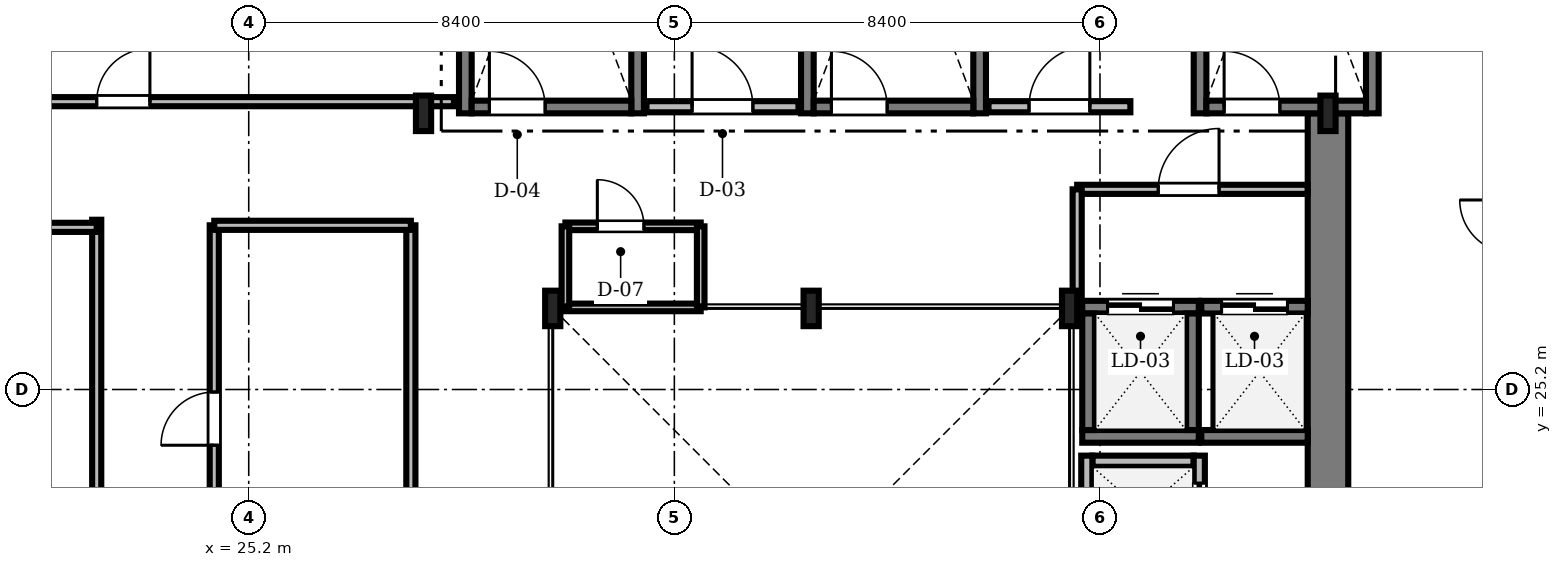
"""IFC4 building model, lengths in metres.
Left out: names, types, materials, properties, quantities, classifications, styles, units other than length and angle.
Written with IfcOpenShell. Run it as: python <this file> out.ifc"""

import sys

from ifc_helpers import new_model, si_unit, direction, frame, frame_2d, origin, origin_2d, place, context, subcontext, project, spatial, rectangle, i_section, extrude, source, transform, mapped, element, fill, save


model = new_model("IFC4")
c1 = context("Model", 3, precision=1e-05, world=origin(), true_north=direction((0.0, 1.0)))
c2 = subcontext(c1, "Body", "Model", "MODEL_VIEW")
j1 = project(units=[si_unit("LENGTHUNIT", "METRE"), si_unit("PLANEANGLEUNIT", "RADIAN")], contexts=[c1])
p1 = place(None, origin())
s1 = spatial("IfcSite", under=j1, at=p1, CompositionType="ELEMENT")
p2 = place(p1, origin())
s2 = spatial("IfcBuilding", under=s1, at=p2, CompositionType="ELEMENT")
p3 = place(p2, frame((0.0, 0.0, 192.3)))
s3 = spatial("IfcBuildingStorey", under=s2, at=p3, CompositionType="ELEMENT", Elevation=192.3)
m1 = source(origin(), c2, "Body", "SweptSolid", [
    extrude(rectangle(XDim=13.15, YDim=0.8, at=frame_2d((6.575, 0.0))), origin(), (0.0, 0.0, 1.0), 3.53),
])
p4 = place(p3, frame((46.5, 17.5, 0.0), z_axis=(0.0, 0.0, 1.0), x_axis=(0.0, 1.0, 0.0)))
e1 = element("IfcWall", 1, at=p4, inside=s3, PredefinedType="SHEAR", context=c2, shape_type="MappedRepresentation", body=[
    mapped(m1, transform((0.0, 0.0, 0.0), scale=1.0)),
])
m2 = source(origin(), c2, "Body", "SweptSolid", [
    extrude(i_section(OverallWidth=0.3, OverallDepth=0.7, WebThickness=0.017, FlangeThickness=0.032, FilletRadius=0.027, at=origin_2d()), origin(), (0.0, 0.0, 1.0), 3.53),
])
for number, where, z_axis, x_axis in (
    (2, (41.4, 26.8, 0.0), (0.0, 0.0, 1.0), (1.0, 0.0, 0.0)),
    (3, (36.3, 26.8, 0.0), (0.0, 0.0, 1.0), (1.0, 0.0, 0.0)),
    (4, (31.2, 26.8, 0.0), (0.0, 0.0, 1.0), (1.0, 0.0, 0.0)),
    (5, (28.65, 30.65, 0.0), (0.0, 0.0, 1.0), (1.0, 0.0, 0.0)),
    (6, (46.5, 30.65, 0.0), (0.0, 0.0, 1.0), (1.0, 0.0, 0.0)),
):
    element("IfcColumn", number, at=place(p3, frame(where, z_axis=z_axis, x_axis=x_axis)), inside=s3, PredefinedType="COLUMN", context=c2, shape_type="MappedRepresentation", body=[
        mapped(m2, transform((0.0, 0.0, 0.0), scale=1.0)),
    ])
m3 = source(origin(), c2, "Body", "SweptSolid", [
    extrude(rectangle(XDim=9.25, YDim=0.25, at=frame_2d((4.625, 0.0))), origin(), (0.0, 0.0, 1.0), 3.55),
])
for number, where, z_axis, x_axis in (
    (7, (29.475, 30.65, 0.0), (0.0, 0.0, 1.0), (0.0, 1.0, 0.0)),
    (8, (32.875, 30.65, 0.0), (0.0, 0.0, 1.0), (0.0, 1.0, 0.0)),
):
    element("IfcWall", number, at=place(p3, frame(where, z_axis=z_axis, x_axis=x_axis)), inside=s3, PredefinedType="SOLIDWALL", context=c2, shape_type="MappedRepresentation", body=[
        mapped(m3, transform((0.0, 0.0, 0.0), scale=1.0)),
    ])
m4 = source(origin(), c2, "Body", "SweptSolid", [
    extrude(rectangle(XDim=3.15, YDim=0.25, at=frame_2d((1.575, 0.0))), origin(), (0.0, 0.0, 1.0), 3.55),
])
p5 = place(p3, frame((29.6, 30.775, 0.0), z_axis=(0.0, 0.0, 1.0), x_axis=(1.0, 0.0, 0.0)))
e9 = element("IfcWall", 9, at=p5, inside=s3, PredefinedType="SOLIDWALL", context=c2, shape_type="MappedRepresentation", body=[
    mapped(m4, transform((0.0, 0.0, 0.0), scale=1.0)),
])
m5 = source(origin(), c2, "Body", "SweptSolid", [
    extrude(rectangle(XDim=1.1, YDim=2.2, at=frame_2d((0.55, 1.1))), frame((0.0, 0.135, 0.0), z_axis=(0.0, -1.0, 0.0), x_axis=(1.0, 0.0, 0.0)), (0.0, 0.0, 1.0), 0.27),
])
p6 = place(p5, frame((0.35, 0.0, 0.0)))
e10 = element("IfcOpeningElement", 10, at=p6, cuts=e9, PredefinedType="OPENING", context=c2, shape_type="MappedRepresentation", body=[
    mapped(m5, transform((0.0, 0.0, 0.0), scale=1.0)),
])
for number, where, z_axis, x_axis in (
    (11, (36.225, 30.65, 0.0), (0.0, 0.0, 1.0), (0.0, 1.0, 0.0)),
    (12, (39.625, 30.65, 0.0), (0.0, 0.0, 1.0), (0.0, 1.0, 0.0)),
):
    element("IfcWall", number, at=place(p3, frame(where, z_axis=z_axis, x_axis=x_axis)), inside=s3, PredefinedType="SOLIDWALL", context=c2, shape_type="MappedRepresentation", body=[
        mapped(m3, transform((0.0, 0.0, 0.0), scale=1.0)),
    ])
p7 = place(p3, frame((36.35, 30.775, 0.0), z_axis=(0.0, 0.0, 1.0), x_axis=(1.0, 0.0, 0.0)))
e13 = element("IfcWall", 13, at=p7, inside=s3, PredefinedType="SOLIDWALL", context=c2, shape_type="MappedRepresentation", body=[
    mapped(m4, transform((0.0, 0.0, 0.0), scale=1.0)),
])
p8 = place(p7, frame((0.35, 0.0, 0.0)))
e14 = element("IfcOpeningElement", 14, at=p8, cuts=e13, PredefinedType="OPENING", context=c2, shape_type="MappedRepresentation", body=[
    mapped(m5, transform((0.0, 0.0, 0.0), scale=1.0)),
])
for number, where, z_axis, x_axis in (
    (15, (43.975, 30.65, 0.0), (0.0, 0.0, 1.0), (0.0, 1.0, 0.0)),
    (16, (47.375, 30.65, 0.0), (0.0, 0.0, 1.0), (0.0, 1.0, 0.0)),
):
    element("IfcWall", number, at=place(p3, frame(where, z_axis=z_axis, x_axis=x_axis)), inside=s3, PredefinedType="SOLIDWALL", context=c2, shape_type="MappedRepresentation", body=[
        mapped(m3, transform((0.0, 0.0, 0.0), scale=1.0)),
    ])
p9 = place(p3, frame((44.1, 30.775, 0.0), z_axis=(0.0, 0.0, 1.0), x_axis=(1.0, 0.0, 0.0)))
e17 = element("IfcWall", 17, at=p9, inside=s3, PredefinedType="SOLIDWALL", context=c2, shape_type="MappedRepresentation", body=[
    mapped(m4, transform((0.0, 0.0, 0.0), scale=1.0)),
])
p10 = place(p9, frame((0.35, 0.0, 0.0)))
e18 = element("IfcOpeningElement", 18, at=p10, cuts=e17, PredefinedType="OPENING", context=c2, shape_type="MappedRepresentation", body=[
    mapped(m5, transform((0.0, 0.0, 0.0), scale=1.0)),
])
m6 = source(origin(), c2, "Body", "SweptSolid", [
    extrude(rectangle(XDim=3.0, YDim=0.22, at=frame_2d((1.5, 0.0))), origin(), (0.0, 0.0, 1.0), 3.53),
])
p11 = place(p3, frame((33.05, 30.78, 0.0), z_axis=(0.0, 0.0, 1.0), x_axis=(1.0, 0.0, 0.0)))
e19 = element("IfcWall", 19, at=p11, inside=s3, PredefinedType="SOLIDWALL", context=c2, shape_type="MappedRepresentation", body=[
    mapped(m6, transform((0.0, 0.0, 0.0), scale=1.0)),
])
m7 = source(origin(), c2, "Body", "SweptSolid", [
    extrude(rectangle(XDim=1.2, YDim=2.2, at=frame_2d((0.6, 1.1))), frame((0.0, 0.12, 0.0), z_axis=(0.0, -1.0, 0.0), x_axis=(1.0, 0.0, 0.0)), (0.0, 0.0, 1.0), 0.24),
])
p12 = place(p11, frame((0.9, 0.0, 0.0)))
e20 = element("IfcOpeningElement", 20, at=p12, cuts=e19, PredefinedType="OPENING", context=c2, shape_type="MappedRepresentation", body=[
    mapped(m7, transform((0.0, 0.0, 0.0), scale=1.0)),
])
m8 = source(origin(), c2, "Body", "SweptSolid", [
    extrude(rectangle(XDim=2.8, YDim=0.22, at=frame_2d((1.4, 0.0))), origin(), (0.0, 0.0, 1.0), 3.53),
])
p13 = place(p3, frame((39.8, 30.78, 0.0), z_axis=(0.0, 0.0, 1.0), x_axis=(1.0, 0.0, 0.0)))
e21 = element("IfcWall", 21, at=p13, inside=s3, PredefinedType="SOLIDWALL", context=c2, shape_type="MappedRepresentation", body=[
    mapped(m8, transform((0.0, 0.0, 0.0), scale=1.0)),
])
p14 = place(p13, frame((0.8, 0.0, 0.0)))
e22 = element("IfcOpeningElement", 22, at=p14, cuts=e21, PredefinedType="OPENING", context=c2, shape_type="MappedRepresentation", body=[
    mapped(m7, transform((0.0, 0.0, 0.0), scale=1.0)),
])
m9 = source(origin(), c2, "Body", "SweptSolid", [
    extrude(rectangle(XDim=2.0, YDim=0.22, at=frame_2d((1.0, 0.0))), origin(), (0.0, 0.0, 1.0), 3.53),
])
p15 = place(p3, frame((41.85, 23.785, 0.0), z_axis=(0.0, 0.0, 1.0), x_axis=(1.0, 0.0, 0.0)))
e23 = element("IfcWall", 23, at=p15, inside=s3, PredefinedType="SOLIDWALL", context=c2, shape_type="MappedRepresentation", body=[
    mapped(m9, transform((0.0, 0.0, 0.0), scale=1.0)),
])
m10 = source(origin(), c2, "Body", "SweptSolid", [
    extrude(rectangle(XDim=2.19, YDim=0.22, at=frame_2d((1.095, 0.0))), origin(), (0.0, 0.0, 1.0), 3.53),
])
p16 = place(p3, frame((41.74, 21.705, 0.0), z_axis=(0.0, 0.0, 1.0), x_axis=(0.0, 1.0, 0.0)))
e24 = element("IfcWall", 24, at=p16, inside=s3, PredefinedType="SOLIDWALL", context=c2, shape_type="MappedRepresentation", body=[
    mapped(m10, transform((0.0, 0.0, 0.0), scale=1.0)),
])
p17 = place(p3, frame((43.96, 21.705, 0.0), z_axis=(0.0, 0.0, 1.0), x_axis=(0.0, 1.0, 0.0)))
e25 = element("IfcWall", 25, at=p17, inside=s3, PredefinedType="SOLIDWALL", context=c2, shape_type="MappedRepresentation", body=[
    mapped(m10, transform((0.0, 0.0, 0.0), scale=1.0)),
])
m11 = source(origin(), c2, "Body", "SweptSolid", [
    extrude(rectangle(XDim=1.1, YDim=2.2, at=frame_2d((0.55, 1.1))), frame((0.0, 0.12, 0.0), z_axis=(0.0, -1.0, 0.0), x_axis=(1.0, 0.0, 0.0)), (0.0, 0.0, 1.0), 0.24),
])
p18 = place(p17, frame((0.545, 0.0, 0.0)))
e26 = element("IfcOpeningElement", 26, at=p18, cuts=e25, PredefinedType="OPENING", context=c2, shape_type="MappedRepresentation", body=[
    mapped(m11, transform((0.0, 0.0, 0.0), scale=1.0)),
])
m12 = source(origin(), c2, "Body", "SweptSolid", [
    extrude(rectangle(XDim=2.3, YDim=0.25, at=frame_2d((1.15, 0.0))), origin(), (0.0, 0.0, 1.0), 3.53),
])
p19 = place(p3, frame((41.65, 24.275, 0.0), z_axis=(0.0, 0.0, 1.0), x_axis=(1.0, 0.0, 0.0)))
e27 = element("IfcWall", 27, at=p19, inside=s3, PredefinedType="SOLIDWALL", context=c2, shape_type="MappedRepresentation", body=[
    mapped(m12, transform((0.0, 0.0, 0.0), scale=1.0)),
])
p20 = place(p3, frame((41.65, 26.825, 0.0), z_axis=(0.0, 0.0, 1.0), x_axis=(1.0, 0.0, 0.0)))
e28 = element("IfcWall", 28, at=p20, inside=s3, PredefinedType="SOLIDWALL", context=c2, shape_type="MappedRepresentation", body=[
    mapped(m12, transform((0.0, 0.0, 0.0), scale=1.0)),
])
m13 = source(origin(), c2, "Body", "SweptSolid", [
    extrude(rectangle(XDim=1.3, YDim=2.3, at=frame_2d((0.65, 1.15))), frame((0.0, 0.135, 0.0), z_axis=(0.0, -1.0, 0.0), x_axis=(1.0, 0.0, 0.0)), (0.0, 0.0, 1.0), 0.27),
])
p21 = place(p20, frame((0.5, 0.0, 0.0)))
e29 = element("IfcOpeningElement", 29, at=p21, cuts=e28, PredefinedType="OPENING", context=c2, shape_type="MappedRepresentation", body=[
    mapped(m13, transform((0.0, 0.0, 0.0), scale=1.0)),
])
for number, where, z_axis, x_axis in (
    (30, (41.775, 24.4, 0.0), (0.0, 0.0, 1.0), (0.0, 1.0, 0.0)),
    (31, (43.825, 24.4, 0.0), (0.0, 0.0, 1.0), (0.0, 1.0, 0.0)),
):
    element("IfcWall", number, at=place(p3, frame(where, z_axis=z_axis, x_axis=x_axis)), inside=s3, PredefinedType="SOLIDWALL", context=c2, shape_type="MappedRepresentation", body=[
        mapped(m12, transform((0.0, 0.0, 0.0), scale=1.0)),
    ])
m14 = source(origin(), c2, "Body", "SweptSolid", [
    extrude(rectangle(XDim=2.1, YDim=0.25, at=frame_2d((1.05, 0.0))), origin(), (0.0, 0.0, 1.0), 3.53),
])
p22 = place(p3, frame((44.0, 24.275, 0.0), z_axis=(0.0, 0.0, 1.0), x_axis=(1.0, 0.0, 0.0)))
e32 = element("IfcWall", 32, at=p22, inside=s3, PredefinedType="SOLIDWALL", context=c2, shape_type="MappedRepresentation", body=[
    mapped(m14, transform((0.0, 0.0, 0.0), scale=1.0)),
])
p23 = place(p3, frame((44.0, 26.825, 0.0), z_axis=(0.0, 0.0, 1.0), x_axis=(1.0, 0.0, 0.0)))
e33 = element("IfcWall", 33, at=p23, inside=s3, PredefinedType="SOLIDWALL", context=c2, shape_type="MappedRepresentation", body=[
    mapped(m14, transform((0.0, 0.0, 0.0), scale=1.0)),
])
p24 = place(p23, frame((0.4, 0.0, 0.0)))
e34 = element("IfcOpeningElement", 34, at=p24, cuts=e33, PredefinedType="OPENING", context=c2, shape_type="MappedRepresentation", body=[
    mapped(m13, transform((0.0, 0.0, 0.0), scale=1.0)),
])
m15 = source(origin(), c2, "Body", "SweptSolid", [
    extrude(rectangle(XDim=17.828, YDim=0.18, at=frame_2d((8.914, 0.0))), origin(), (0.0, 0.0, 1.0), 2.772),
])
p25 = place(p3, frame((11.422, 30.88, 0.0), z_axis=(0.0, 0.0, 1.0), x_axis=(1.0, 0.0, 0.0)))
e35 = element("IfcWall", 35, at=p25, inside=s3, PredefinedType="PARTITIONING", context=c2, shape_type="MappedRepresentation", body=[
    mapped(m15, transform((0.0, 0.0, 0.0), scale=1.0)),
])
m16 = source(origin(), c2, "Body", "SweptSolid", [
    extrude(rectangle(XDim=1.05, YDim=2.2, at=frame_2d((0.525, 1.1))), frame((0.0, 0.1, 0.0), z_axis=(0.0, -1.0, 0.0), x_axis=(1.0, 0.0, 0.0)), (0.0, 0.0, 1.0), 0.2),
])
p26 = place(p25, frame((10.778, 0.0, 0.0)))
e36 = element("IfcOpeningElement", 36, at=p26, cuts=e35, PredefinedType="OPENING", context=c2, shape_type="MappedRepresentation", body=[
    mapped(m16, transform((0.0, 0.0, 0.0), scale=1.0)),
])
m17 = source(origin(), c2, "Body", "SweptSolid", [
    extrude(rectangle(XDim=14.98, YDim=0.18, at=frame_2d((7.49, 0.0))), origin(), (0.0, 0.0, 1.0), 2.972),
])
p27 = place(p3, frame((22.2, 13.57, 0.0), z_axis=(0.0, 0.0, 1.0), x_axis=(0.0, 1.0, 0.0)))
e37 = element("IfcWall", 37, at=p27, inside=s3, PredefinedType="PARTITIONING", context=c2, shape_type="MappedRepresentation", body=[
    mapped(m17, transform((0.0, 0.0, 0.0), scale=1.0)),
])
p28 = place(p27, frame((1.6, 0.0, 0.0)))
e38 = element("IfcOpeningElement", 38, at=p28, cuts=e37, PredefinedType="OPENING", context=c2, shape_type="MappedRepresentation", body=[
    mapped(m16, transform((0.0, 0.0, 0.0), scale=1.0)),
])
m18 = source(origin(), c2, "Body", "SweptSolid", [
    extrude(rectangle(XDim=6.54, YDim=0.18, at=frame_2d((3.27, 0.0))), origin(), (0.0, 0.0, 1.0), 2.972),
])
p29 = place(p3, frame((24.52, 21.9, 0.0), z_axis=(0.0, 0.0, 1.0), x_axis=(0.0, 1.0, 0.0)))
e39 = element("IfcWall", 39, at=p29, inside=s3, PredefinedType="PARTITIONING", context=c2, shape_type="MappedRepresentation", body=[
    mapped(m18, transform((0.0, 0.0, 0.0), scale=1.0)),
])
p30 = place(p29, frame((2.2, 0.0, 0.0)))
e40 = element("IfcOpeningElement", 40, at=p30, cuts=e39, PredefinedType="OPENING", context=c2, shape_type="MappedRepresentation", body=[
    mapped(m16, transform((0.0, 0.0, 0.0), scale=1.0)),
])
m19 = source(origin(), c2, "Body", "SweptSolid", [
    extrude(rectangle(XDim=4.548, YDim=0.18, at=frame_2d((2.274, 0.0))), origin(), (0.0, 0.0, 1.0), 3.162),
])
p31 = place(p3, frame((41.55, 29.15, 0.0), z_axis=(0.0, 0.0, 1.0), x_axis=(1.0, 0.0, 0.0)))
e41 = element("IfcWall", 41, at=p31, inside=s3, PredefinedType="PARTITIONING", context=c2, shape_type="MappedRepresentation", body=[
    mapped(m19, transform((0.0, 0.0, 0.0), scale=1.0)),
])
m20 = source(origin(), c2, "Body", "SweptSolid", [
    extrude(rectangle(XDim=1.2, YDim=2.2, at=frame_2d((0.6, 1.1))), frame((0.0, 0.1, 0.0), z_axis=(0.0, -1.0, 0.0), x_axis=(1.0, 0.0, 0.0)), (0.0, 0.0, 1.0), 0.2),
])
p32 = place(p31, frame((1.6, 0.0, 0.0)))
e42 = element("IfcOpeningElement", 42, at=p32, cuts=e41, PredefinedType="OPENING", context=c2, shape_type="MappedRepresentation", body=[
    mapped(m20, transform((0.0, 0.0, 0.0), scale=1.0)),
])
m21 = source(origin(), c2, "Body", "SweptSolid", [
    extrude(rectangle(XDim=2.67, YDim=0.15, at=frame_2d((1.335, 0.0))), origin(), (0.0, 0.0, 1.0), 3.162),
])
p33 = place(p3, frame((31.45, 28.42, 0.0), z_axis=(0.0, 0.0, 1.0), x_axis=(1.0, 0.0, 0.0)))
e43 = element("IfcWall", 43, at=p33, inside=s3, PredefinedType="PARTITIONING", context=c2, shape_type="MappedRepresentation", body=[
    mapped(m21, transform((0.0, 0.0, 0.0), scale=1.0)),
])
m22 = source(origin(), c2, "Body", "SweptSolid", [
    extrude(rectangle(XDim=0.92, YDim=2.1, at=frame_2d((0.46, 1.05))), frame((0.0, 0.085, 0.0), z_axis=(0.0, -1.0, 0.0), x_axis=(1.0, 0.0, 0.0)), (0.0, 0.0, 1.0), 0.17),
])
p34 = place(p33, frame((0.63, 0.0, 0.0)))
e44 = element("IfcOpeningElement", 44, at=p34, cuts=e43, PredefinedType="OPENING", context=c2, shape_type="MappedRepresentation", body=[
    mapped(m22, transform((0.0, 0.0, 0.0), scale=1.0)),
])
m23 = source(origin(), c2, "Body", "SweptSolid", [
    extrude(rectangle(XDim=10.97, YDim=0.18, at=frame_2d((5.485, 0.0))), origin(), (0.0, 0.0, 1.0), 2.772),
])
p35 = place(p3, frame((11.23, 28.4, 0.0), z_axis=(0.0, 0.0, 1.0), x_axis=(1.0, 0.0, 0.0)))
e45 = element("IfcWall", 45, at=p35, inside=s3, PredefinedType="PARTITIONING", context=c2, shape_type="MappedRepresentation", body=[
    mapped(m23, transform((0.0, 0.0, 0.0), scale=1.0)),
])
p36 = place(p3, frame((28.4, 21.9, 0.0), z_axis=(0.0, 0.0, 1.0), x_axis=(0.0, 1.0, 0.0)))
e46 = element("IfcWall", 46, at=p36, inside=s3, PredefinedType="PARTITIONING", context=c2, shape_type="MappedRepresentation", body=[
    mapped(m18, transform((0.0, 0.0, 0.0), scale=1.0)),
])
m24 = source(origin(), c2, "Body", "SweptSolid", [
    extrude(rectangle(XDim=3.88, YDim=0.18, at=frame_2d((1.94, 0.0))), origin(), (0.0, 0.0, 1.0), 3.53),
])
p37 = place(p3, frame((24.52, 28.44, 0.0), z_axis=(0.0, 0.0, 1.0), x_axis=(1.0, 0.0, 0.0)))
e47 = element("IfcWall", 47, at=p37, inside=s3, PredefinedType="PARTITIONING", context=c2, shape_type="MappedRepresentation", body=[
    mapped(m24, transform((0.0, 0.0, 0.0), scale=1.0)),
])
m25 = source(origin(), c2, "Body", "SweptSolid", [
    extrude(rectangle(XDim=2.67, YDim=0.15, at=frame_2d((1.335, 0.0))), origin(), (0.0, 0.0, 1.0), 3.072),
])
p38 = place(p3, frame((31.45, 26.82, 0.0), z_axis=(0.0, 0.0, 1.0), x_axis=(1.0, 0.0, 0.0)))
e48 = element("IfcWall", 48, at=p38, inside=s3, PredefinedType="PARTITIONING", context=c2, shape_type="MappedRepresentation", body=[
    mapped(m25, transform((0.0, 0.0, 0.0), scale=1.0)),
])
m26 = source(origin(), c2, "Body", "SweptSolid", [
    extrude(rectangle(XDim=2.35, YDim=0.18, at=frame_2d((1.175, 0.0))), origin(), (0.0, 0.0, 1.0), 2.972),
])
p39 = place(p3, frame((41.55, 26.8, 0.0), z_axis=(0.0, 0.0, 1.0), x_axis=(0.0, 1.0, 0.0)))
e49 = element("IfcWall", 49, at=p39, inside=s3, PredefinedType="PARTITIONING", context=c2, shape_type="MappedRepresentation", body=[
    mapped(m26, transform((0.0, 0.0, 0.0), scale=1.0)),
])
m27 = source(origin(), c2, "Body", "SweptSolid", [
    extrude(rectangle(XDim=1.6, YDim=0.15, at=frame_2d((0.8, 0.0))), origin(), (0.0, 0.0, 1.0), 3.072),
])
for number, where, z_axis, x_axis in (
    (50, (31.45, 26.82, 0.0), (0.0, 0.0, 1.0), (0.0, 1.0, 0.0)),
    (51, (34.12, 26.82, 0.0), (0.0, 0.0, 1.0), (0.0, 1.0, 0.0)),
):
    element("IfcWall", number, at=place(p3, frame(where, z_axis=z_axis, x_axis=x_axis)), inside=s3, PredefinedType="PARTITIONING", context=c2, shape_type="MappedRepresentation", body=[
        mapped(m27, transform((0.0, 0.0, 0.0), scale=1.0)),
    ])
m28 = source(origin(), c2, "Body", "SweptSolid", [
    extrude(rectangle(XDim=1.1, YDim=2.2, at=frame_2d((0.55, 1.1))), frame((0.0, 0.025, 0.0), z_axis=(0.0, -1.0, 0.0), x_axis=(1.0, 0.0, 0.0)), (0.0, 0.0, 1.0), 0.05),
])
p40 = place(p6, origin())
e52 = element("IfcDoor", 52, at=p40, inside=s3, OperationType="SINGLE_SWING_LEFT", PredefinedType="DOOR", context=c2, shape_type="MappedRepresentation", body=[
    mapped(m28, transform((0.0, 0.0, 0.0), scale=1.0)),
])
fill(e10, e52)
p41 = place(p8, origin())
e53 = element("IfcDoor", 53, at=p41, inside=s3, OperationType="SINGLE_SWING_LEFT", PredefinedType="DOOR", context=c2, shape_type="MappedRepresentation", body=[
    mapped(m28, transform((0.0, 0.0, 0.0), scale=1.0)),
])
fill(e14, e53)
p42 = place(p10, origin())
e54 = element("IfcDoor", 54, at=p42, inside=s3, OperationType="SINGLE_SWING_LEFT", PredefinedType="DOOR", context=c2, shape_type="MappedRepresentation", body=[
    mapped(m28, transform((0.0, 0.0, 0.0), scale=1.0)),
])
fill(e18, e54)
m29 = source(origin(), c2, "Body", "SweptSolid", [
    extrude(rectangle(XDim=1.2, YDim=2.2, at=frame_2d((0.6, 1.1))), frame((0.0, 0.025, 0.0), z_axis=(0.0, -1.0, 0.0), x_axis=(1.0, 0.0, 0.0)), (0.0, 0.0, 1.0), 0.05),
])
p43 = place(p12, origin())
e55 = element("IfcDoor", 55, at=p43, inside=s3, OperationType="SINGLE_SWING_LEFT", PredefinedType="DOOR", context=c2, shape_type="MappedRepresentation", body=[
    mapped(m29, transform((0.0, 0.0, 0.0), scale=1.0)),
])
fill(e20, e55)
p44 = place(p14, origin())
e56 = element("IfcDoor", 56, at=p44, inside=s3, OperationType="SINGLE_SWING_RIGHT", PredefinedType="DOOR", context=c2, shape_type="MappedRepresentation", body=[
    mapped(m29, transform((0.0, 0.0, 0.0), scale=1.0)),
])
fill(e22, e56)
p45 = place(p18, origin())
e57 = element("IfcDoor", 57, at=p45, inside=s3, OperationType="DOUBLE_DOOR_SLIDING", PredefinedType="DOOR", context=c2, shape_type="MappedRepresentation", body=[
    mapped(m28, transform((0.0, 0.0, 0.0), scale=1.0)),
])
fill(e26, e57)
m30 = source(origin(), c2, "Body", "SweptSolid", [
    extrude(rectangle(XDim=1.3, YDim=2.3, at=frame_2d((0.65, 1.15))), frame((0.0, 0.025, 0.0), z_axis=(0.0, -1.0, 0.0), x_axis=(1.0, 0.0, 0.0)), (0.0, 0.0, 1.0), 0.05),
])
p46 = place(p21, origin())
e58 = element("IfcDoor", 58, at=p46, inside=s3, OperationType="DOUBLE_DOOR_SLIDING", PredefinedType="DOOR", context=c2, shape_type="MappedRepresentation", body=[
    mapped(m30, transform((0.0, 0.0, 0.0), scale=1.0)),
])
fill(e29, e58)
p47 = place(p24, origin())
e59 = element("IfcDoor", 59, at=p47, inside=s3, OperationType="DOUBLE_DOOR_SLIDING", PredefinedType="DOOR", context=c2, shape_type="MappedRepresentation", body=[
    mapped(m30, transform((0.0, 0.0, 0.0), scale=1.0)),
])
fill(e34, e59)
m31 = source(origin(), c2, "Body", "SweptSolid", [
    extrude(rectangle(XDim=1.05, YDim=2.2, at=frame_2d((0.525, 1.1))), frame((0.0, 0.025, 0.0), z_axis=(0.0, -1.0, 0.0), x_axis=(1.0, 0.0, 0.0)), (0.0, 0.0, 1.0), 0.05),
])
p48 = place(p26, origin())
e60 = element("IfcDoor", 60, at=p48, inside=s3, OperationType="SINGLE_SWING_RIGHT", PredefinedType="DOOR", context=c2, shape_type="MappedRepresentation", body=[
    mapped(m31, transform((0.0, 0.0, 0.0), scale=1.0)),
])
fill(e36, e60)
p49 = place(p30, origin())
e61 = element("IfcDoor", 61, at=p49, inside=s3, OperationType="SINGLE_SWING_LEFT", PredefinedType="DOOR", context=c2, shape_type="MappedRepresentation", body=[
    mapped(m31, transform((0.0, 0.0, 0.0), scale=1.0)),
])
fill(e40, e61)
p50 = place(p32, origin())
e62 = element("IfcDoor", 62, at=p50, inside=s3, OperationType="SINGLE_SWING_RIGHT", PredefinedType="DOOR", context=c2, shape_type="MappedRepresentation", body=[
    mapped(m29, transform((0.0, 0.0, 0.0), scale=1.0)),
])
fill(e42, e62)
m32 = source(origin(), c2, "Body", "SweptSolid", [
    extrude(rectangle(XDim=0.92, YDim=2.1, at=frame_2d((0.46, 1.05))), frame((0.0, 0.025, 0.0), z_axis=(0.0, -1.0, 0.0), x_axis=(1.0, 0.0, 0.0)), (0.0, 0.0, 1.0), 0.05),
])
p51 = place(p34, origin())
e63 = element("IfcDoor", 63, at=p51, inside=s3, OperationType="SINGLE_SWING_LEFT", PredefinedType="DOOR", context=c2, shape_type="MappedRepresentation", body=[
    mapped(m32, transform((0.0, 0.0, 0.0), scale=1.0)),
])
fill(e44, e63)
save(model, sys.argv[1])
